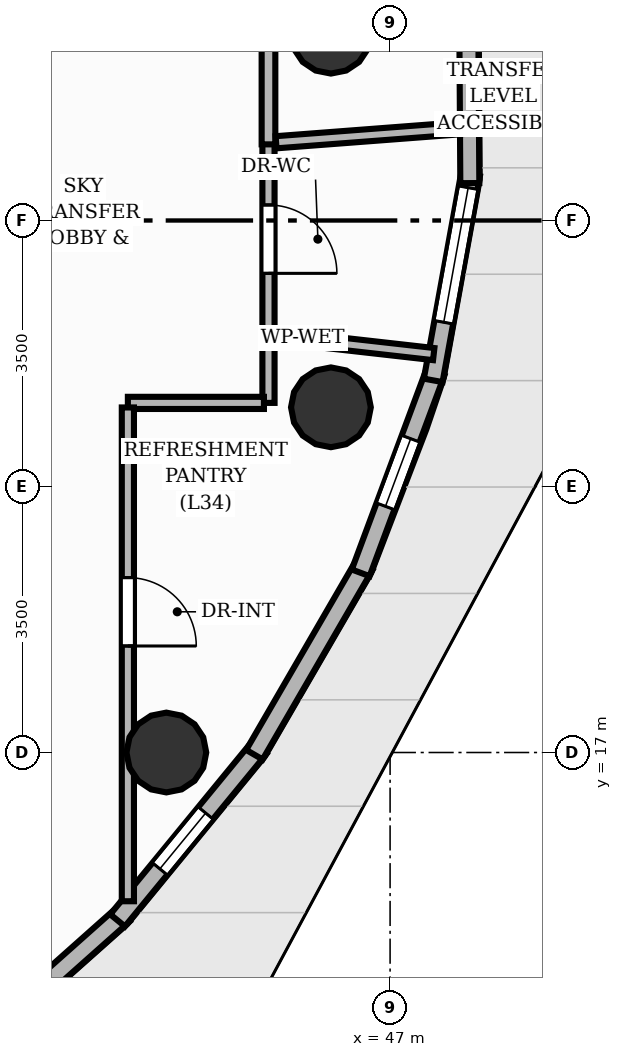
"""IFC4 building model, lengths in metres.
Left out: names, types, materials, properties, quantities, classifications, styles, units other than length and angle.
Written with IfcOpenShell. Run it as: python <this file> out.ifc"""

import sys

from ifc_helpers import new_model, si_unit, direction, frame, frame_2d, origin, origin_2d, place, context, subcontext, project, spatial, rectangle, circle, extrude, element, fill, save


model = new_model("IFC4")
c1 = context("Model", 3, precision=1e-05, world=origin(), true_north=direction((0.0, 1.0)))
c2 = subcontext(c1, "Body", "Model", "MODEL_VIEW")
j1 = project(units=[si_unit("LENGTHUNIT", "METRE"), si_unit("PLANEANGLEUNIT", "RADIAN")], contexts=[c1])
p1 = place(None, origin())
s1 = spatial("IfcSite", under=j1, at=p1, CompositionType="ELEMENT")
p2 = place(p1, origin())
s2 = spatial("IfcBuilding", under=s1, at=p2, CompositionType="ELEMENT")
p3 = place(p2, frame((0.0, 0.0, 116.96)))
s3 = spatial("IfcBuildingStorey", under=s2, at=p3, CompositionType="ELEMENT", Elevation=116.96)
for number, where, z_axis, x_axis in (
    (1, (46.221, 26.458, 0.0), (0.0, 0.0, 1.0), (1.0, 0.0, 0.0)),
    (2, (44.056, 17.0, 0.0), (0.0, 0.0, 1.0), (1.0, 0.0, 0.0)),
    (3, (46.221, 21.542, 0.0), (0.0, 0.0, 1.0), (1.0, 0.0, 0.0)),
):
    element("IfcColumn", number, at=place(p3, frame(where, z_axis=z_axis, x_axis=x_axis)), inside=s3, PredefinedType="COLUMN", context=c2, shape_type="SweptSolid", body=[
        extrude(circle(Radius=0.525, at=origin_2d()), origin(), (0.0, 0.0, 1.0), 3.2),
    ])
p4 = place(p3, frame((43.49, 14.87, 0.0), z_axis=(0.0, 0.0, 1.0), x_axis=(-0.746920467444, -0.664913389332, 0.0)))
e4 = element("IfcWall", 4, at=p4, inside=s3, PredefinedType="SOLIDWALL", context=c2, shape_type="SweptSolid", body=[
    extrude(rectangle(XDim=2.977, YDim=0.25, at=frame_2d((1.489, 0.0))), origin(), (0.0, 0.0, 1.0), 2.96),
])
p5 = place(p3, frame((45.278, 17.062, 0.0), z_axis=(0.0, 0.0, 1.0), x_axis=(-0.634328076021, -0.7730639637, 0.0)))
e5 = element("IfcWall", 5, at=p5, inside=s3, PredefinedType="SOLIDWALL", context=c2, shape_type="SweptSolid", body=[
    extrude(rectangle(XDim=2.937, YDim=0.25, at=frame_2d((1.469, 0.0))), origin(), (0.0, 0.0, 1.0), 2.96),
])
p6 = place(p5, frame((1.11, 0.0, 0.85)))
e6 = element("IfcOpeningElement", 6, at=p6, cuts=e5, PredefinedType="OPENING", context=c2, shape_type="SweptSolid", body=[
    extrude(rectangle(XDim=0.95, YDim=1.45, at=frame_2d((0.475, 0.725))), frame((0.0, 0.135, 0.0), z_axis=(0.0, -1.0, 0.0), x_axis=(1.0, 0.0, 0.0)), (0.0, 0.0, 1.0), 0.27),
])
p7 = place(p3, frame((46.66, 19.464, 0.0), z_axis=(0.0, 0.0, 1.0), x_axis=(-0.501630602612, -0.865081925903, 0.0)))
e7 = element("IfcWall", 7, at=p7, inside=s3, PredefinedType="SOLIDWALL", context=c2, shape_type="SweptSolid", body=[
    extrude(rectangle(XDim=2.882, YDim=0.25, at=frame_2d((1.441, 0.0))), origin(), (0.0, 0.0, 1.0), 2.96),
])
p8 = place(p3, frame((47.597, 22.004, 0.0), z_axis=(0.0, 0.0, 1.0), x_axis=(-0.349100071797, -0.93708544961, 0.0)))
e8 = element("IfcWall", 8, at=p8, inside=s3, PredefinedType="SOLIDWALL", context=c2, shape_type="SweptSolid", body=[
    extrude(rectangle(XDim=2.818, YDim=0.25, at=frame_2d((1.409, 0.0))), origin(), (0.0, 0.0, 1.0), 2.96),
])
p9 = place(p8, frame((0.934, 0.0, 0.85)))
e9 = element("IfcOpeningElement", 9, at=p9, cuts=e8, PredefinedType="OPENING", context=c2, shape_type="SweptSolid", body=[
    extrude(rectangle(XDim=0.95, YDim=1.45, at=frame_2d((0.475, 0.725))), frame((0.0, 0.135, 0.0), z_axis=(0.0, -1.0, 0.0), x_axis=(1.0, 0.0, 0.0)), (0.0, 0.0, 1.0), 0.27),
])
p10 = place(p3, frame((48.059, 24.604, 0.0), z_axis=(0.0, 0.0, 1.0), x_axis=(-0.178495077034, -0.983940804863, 0.0)))
e10 = element("IfcWall", 10, at=p10, inside=s3, PredefinedType="SOLIDWALL", context=c2, shape_type="SweptSolid", body=[
    extrude(rectangle(XDim=2.752, YDim=0.25, at=frame_2d((1.376, 0.0))), origin(), (0.0, 0.0, 1.0), 2.96),
])
p11 = place(p10, frame((0.175, 0.0, 0.85)))
e11 = element("IfcOpeningElement", 11, at=p11, cuts=e10, PredefinedType="OPENING", context=c2, shape_type="SweptSolid", body=[
    extrude(rectangle(XDim=1.8, YDim=2.0, at=frame_2d((0.9, 1.0))), frame((0.0, 0.135, 0.0), z_axis=(0.0, -1.0, 0.0), x_axis=(1.0, 0.0, 0.0)), (0.0, 0.0, 1.0), 0.27),
])
p12 = place(p3, frame((48.032, 27.185, 0.0), z_axis=(0.0, 0.0, 1.0), x_axis=(0.006164887379, -0.999980996901, 0.0)))
e12 = element("IfcWall", 12, at=p12, inside=s3, PredefinedType="SOLIDWALL", context=c2, shape_type="SweptSolid", body=[
    extrude(rectangle(XDim=2.693, YDim=0.25, at=frame_2d((1.346, 0.0))), origin(), (0.0, 0.0, 1.0), 2.96),
])
p13 = place(p3, frame((45.4, 25.042, 0.0), z_axis=(0.0, 0.0, 1.0), x_axis=(0.0, -1.0, 0.0)))
e13 = element("IfcWall", 13, at=p13, inside=s3, PredefinedType="PLUMBINGWALL", context=c2, shape_type="SweptSolid", body=[
    extrude(rectangle(XDim=3.442, YDim=0.16, at=frame_2d((1.721, 0.0))), origin(), (0.0, 0.0, 1.0), 2.955),
])
p14 = place(p13, frame((0.837, 0.0, 0.0)))
e14 = element("IfcOpeningElement", 14, at=p14, cuts=e13, PredefinedType="OPENING", context=c2, shape_type="SweptSolid", body=[
    extrude(rectangle(XDim=0.9, YDim=2.1, at=frame_2d((0.45, 1.05))), frame((0.0, 0.09, 0.0), z_axis=(0.0, -1.0, 0.0), x_axis=(1.0, 0.0, 0.0)), (0.0, 0.0, 1.0), 0.18),
])
p15 = place(p3, frame((45.34, 21.6, 0.0), z_axis=(0.0, 0.0, 1.0), x_axis=(-1.0, 0.0, 0.0)))
e15 = element("IfcWall", 15, at=p15, inside=s3, PredefinedType="PLUMBINGWALL", context=c2, shape_type="SweptSolid", body=[
    extrude(rectangle(XDim=1.79, YDim=0.16, at=frame_2d((0.895, 0.0))), origin(), (0.0, 0.0, 1.0), 2.336),
])
p16 = place(p3, frame((43.55, 21.54, 0.0), z_axis=(0.0, 0.0, 1.0), x_axis=(0.0, -1.0, 0.0)))
e16 = element("IfcWall", 16, at=p16, inside=s3, PredefinedType="PLUMBINGWALL", context=c2, shape_type="SweptSolid", body=[
    extrude(rectangle(XDim=6.497, YDim=0.16, at=frame_2d((3.249, 0.0))), origin(), (0.0, 0.0, 1.0), 2.955),
])
p17 = place(p16, frame((2.239, 0.0, 0.0)))
e17 = element("IfcOpeningElement", 17, at=p17, cuts=e16, PredefinedType="OPENING", context=c2, shape_type="SweptSolid", body=[
    extrude(rectangle(XDim=0.9, YDim=2.1, at=frame_2d((0.45, 1.05))), frame((0.0, 0.09, 0.0), z_axis=(0.0, -1.0, 0.0), x_axis=(1.0, 0.0, 0.0)), (0.0, 0.0, 1.0), 0.18),
])
p18 = place(p3, frame((45.4, 26.34, 0.0), z_axis=(0.0, 0.0, 1.0), x_axis=(0.0, -1.0, 0.0)))
e18 = element("IfcWall", 18, at=p18, inside=s3, PredefinedType="PARTITIONING", context=c2, shape_type="SweptSolid", body=[
    extrude(rectangle(XDim=1.338, YDim=0.18, at=frame_2d((0.669, 0.0))), origin(), (0.0, 0.0, 1.0), 2.955),
])
p19 = place(p3, frame((45.479, 22.479, 0.0), z_axis=(0.0, 0.0, 1.0), x_axis=(0.993695883818, -0.1121092792, 0.0)))
e19 = element("IfcWall", 19, at=p19, inside=s3, PredefinedType="PLUMBINGWALL", context=c2, shape_type="SweptSolid", body=[
    extrude(rectangle(XDim=2.108, YDim=0.16, at=frame_2d((1.054, 0.0))), origin(), (0.0, 0.0, 1.0), 2.955),
])
p20 = place(p3, frame((47.99, 25.219, 0.0), z_axis=(0.0, 0.0, 1.0), x_axis=(-0.997110011019, -0.075971217745, 0.0)))
e20 = element("IfcWall", 20, at=p20, inside=s3, PredefinedType="PLUMBINGWALL", context=c2, shape_type="SweptSolid", body=[
    extrude(rectangle(XDim=2.497, YDim=0.16, at=frame_2d((1.249, 0.0))), origin(), (0.0, 0.0, 1.0), 2.955),
])
p21 = place(p6, origin())
e21 = element("IfcWindow", 21, at=p21, inside=s3, PartitioningType="SINGLE_PANEL", PredefinedType="WINDOW", context=c2, shape_type="SweptSolid", body=[
    extrude(rectangle(XDim=0.95, YDim=1.45, at=frame_2d((0.475, 0.725))), frame((0.0, 0.03, 0.0), z_axis=(0.0, -1.0, 0.0), x_axis=(1.0, 0.0, 0.0)), (0.0, 0.0, 1.0), 0.06),
])
fill(e6, e21)
p22 = place(p9, origin())
e22 = element("IfcWindow", 22, at=p22, inside=s3, PartitioningType="SINGLE_PANEL", PredefinedType="WINDOW", context=c2, shape_type="SweptSolid", body=[
    extrude(rectangle(XDim=0.95, YDim=1.45, at=frame_2d((0.475, 0.725))), frame((0.0, 0.03, 0.0), z_axis=(0.0, -1.0, 0.0), x_axis=(1.0, 0.0, 0.0)), (0.0, 0.0, 1.0), 0.06),
])
fill(e9, e22)
p23 = place(p11, origin())
e23 = element("IfcWindow", 23, at=p23, inside=s3, PartitioningType="SINGLE_PANEL", PredefinedType="WINDOW", context=c2, shape_type="SweptSolid", body=[
    extrude(rectangle(XDim=1.8, YDim=2.0, at=frame_2d((0.9, 1.0))), frame((0.0, 0.03, 0.0), z_axis=(0.0, -1.0, 0.0), x_axis=(1.0, 0.0, 0.0)), (0.0, 0.0, 1.0), 0.06),
])
fill(e11, e23)
p24 = place(p17, origin())
e24 = element("IfcDoor", 24, at=p24, inside=s3, OperationType="SINGLE_SWING_RIGHT", PredefinedType="DOOR", context=c2, shape_type="SweptSolid", body=[
    extrude(rectangle(XDim=0.9, YDim=2.1, at=frame_2d((0.45, 1.05))), frame((0.0, 0.025, 0.0), z_axis=(0.0, -1.0, 0.0), x_axis=(1.0, 0.0, 0.0)), (0.0, 0.0, 1.0), 0.05),
])
fill(e17, e24)
p25 = place(p14, origin())
e25 = element("IfcDoor", 25, at=p25, inside=s3, OperationType="SINGLE_SWING_RIGHT", PredefinedType="DOOR", context=c2, shape_type="SweptSolid", body=[
    extrude(rectangle(XDim=0.9, YDim=2.1, at=frame_2d((0.45, 1.05))), frame((0.0, 0.025, 0.0), z_axis=(0.0, -1.0, 0.0), x_axis=(1.0, 0.0, 0.0)), (0.0, 0.0, 1.0), 0.05),
])
fill(e14, e25)
save(model, sys.argv[1])
